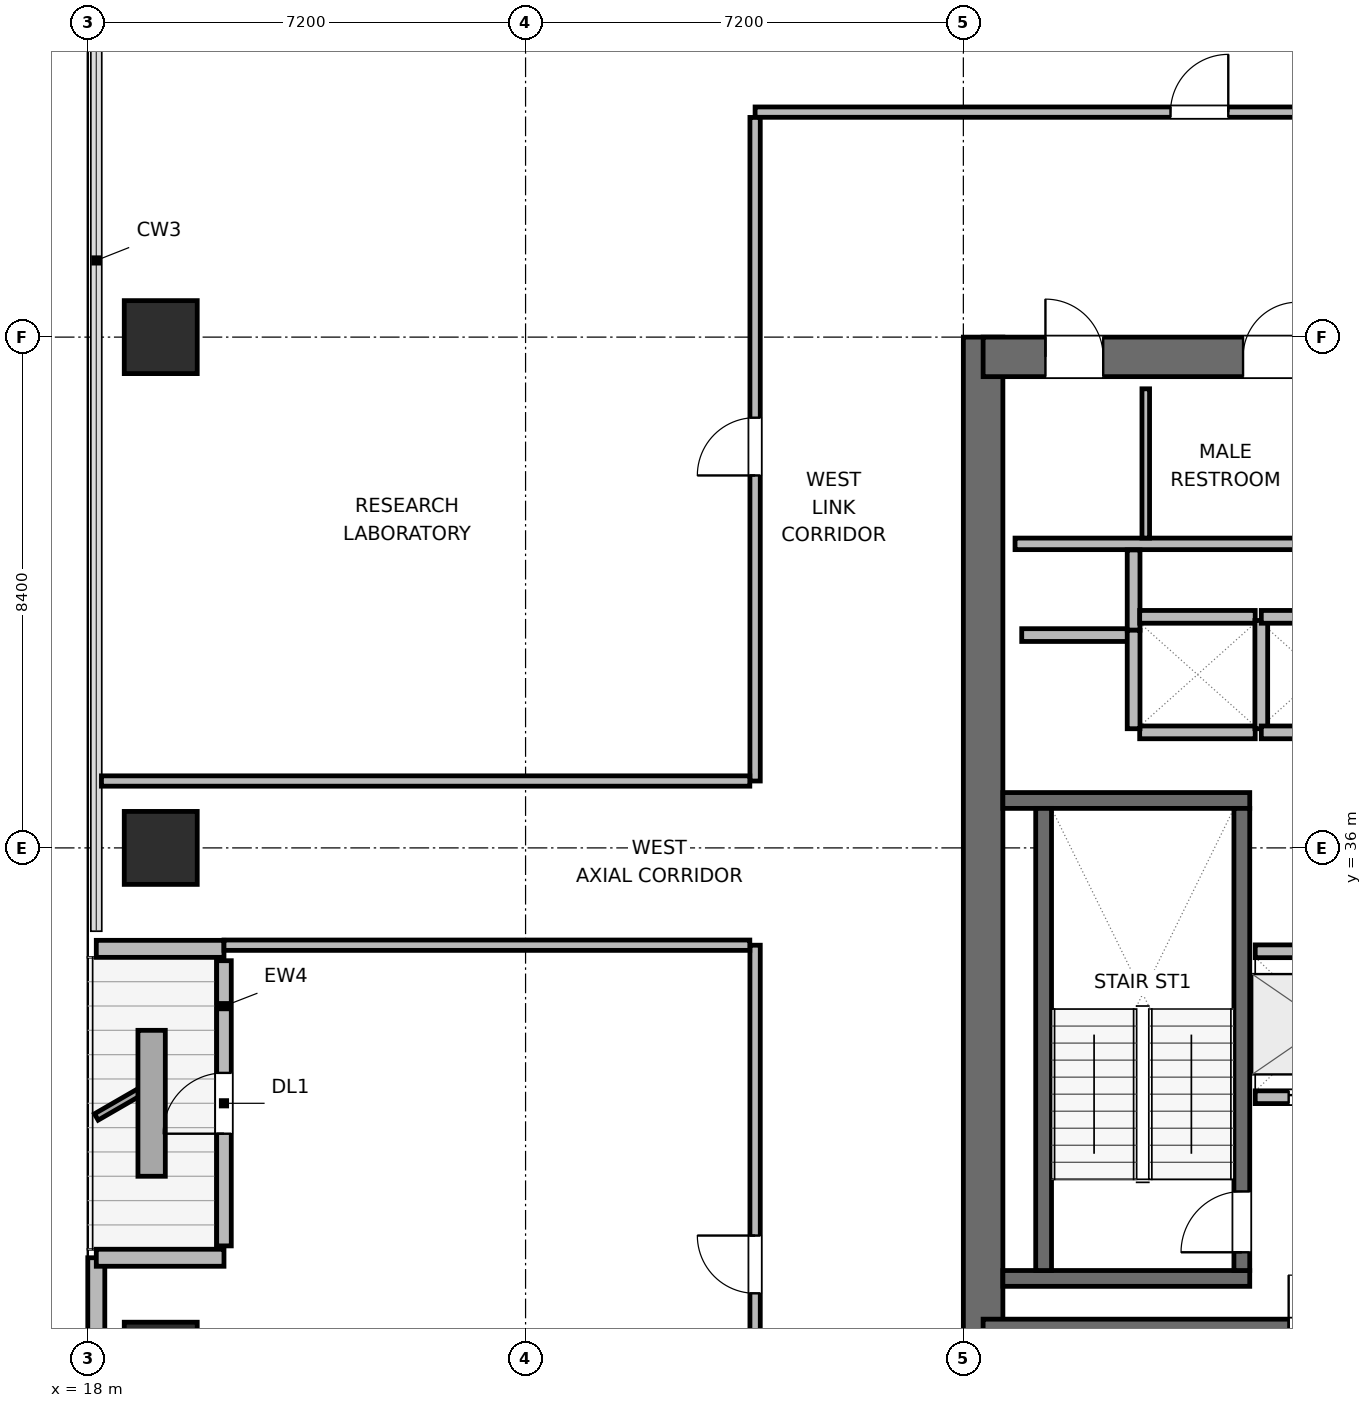
"""IFC4 building model, lengths in metres.
Left out: names, types, materials, properties, quantities, classifications, styles, units other than length and angle.
Written with IfcOpenShell. Run it as: python <this file> out.ifc"""

import sys

from ifc_helpers import new_model, si_unit, direction, frame, frame_2d, origin, origin_2d, place, context, subcontext, project, spatial, rectangle, extrude, element, fill, save


model = new_model("IFC4")
c1 = context("Model", 3, precision=1e-05, world=origin(), true_north=direction((0.0, 1.0)))
c2 = subcontext(c1, "Body", "Model", "MODEL_VIEW")
j1 = project(units=[si_unit("LENGTHUNIT", "METRE"), si_unit("PLANEANGLEUNIT", "RADIAN")], contexts=[c1])
p1 = place(None, origin())
s1 = spatial("IfcSite", under=j1, at=p1, CompositionType="ELEMENT")
p2 = place(p1, origin())
s2 = spatial("IfcBuilding", under=s1, at=p2, CompositionType="ELEMENT")
p3 = place(p2, frame((0.0, 0.0, 205.8)))
s3 = spatial("IfcBuildingStorey", under=s2, at=p3, CompositionType="ELEMENT", Elevation=205.8)
p4 = place(p3, frame((32.725, 27.6, 0.0), z_axis=(0.0, 0.0, 1.0), x_axis=(0.0, 1.0, 0.0)))
e1 = element("IfcWall", 1, at=p4, inside=s3, PredefinedType="SHEAR", context=c2, shape_type="SweptSolid", body=[
    extrude(rectangle(XDim=16.8, YDim=0.65, at=frame_2d((8.4, 0.0))), origin(), (0.0, 0.0, 1.0), 3.9),
])
p5 = place(p3, frame((32.725, 27.925, 0.0), z_axis=(0.0, 0.0, 1.0), x_axis=(1.0, 0.0, 0.0)))
e2 = element("IfcWall", 2, at=p5, inside=s3, PredefinedType="SHEAR", context=c2, shape_type="SweptSolid", body=[
    extrude(rectangle(XDim=9.35, YDim=0.65, at=frame_2d((4.675, 0.0))), origin(), (0.0, 0.0, 1.0), 3.9),
])
p6 = place(p5, frame((5.025, 0.0, 0.0)))
e3 = element("IfcOpeningElement", 3, at=p6, cuts=e2, PredefinedType="OPENING", context=c2, shape_type="SweptSolid", body=[
    extrude(rectangle(XDim=1.05, YDim=2.04, at=frame_2d((0.525, 1.02))), frame((0.0, 0.335, 0.0), z_axis=(0.0, -1.0, 0.0), x_axis=(1.0, 0.0, 0.0)), (0.0, 0.0, 1.0), 0.67),
])
p7 = place(p3, frame((32.725, 44.075, 0.0), z_axis=(0.0, 0.0, 1.0), x_axis=(1.0, 0.0, 0.0)))
e4 = element("IfcWall", 4, at=p7, inside=s3, PredefinedType="SHEAR", context=c2, shape_type="SweptSolid", body=[
    extrude(rectangle(XDim=9.35, YDim=0.65, at=frame_2d((4.675, 0.0))), origin(), (0.0, 0.0, 1.0), 3.9),
])
p8 = place(p7, frame((1.025, 0.0, 0.0)))
e5 = element("IfcOpeningElement", 5, at=p8, cuts=e4, PredefinedType="OPENING", context=c2, shape_type="SweptSolid", body=[
    extrude(rectangle(XDim=0.95, YDim=2.04, at=frame_2d((0.475, 1.02))), frame((0.0, 0.335, 0.0), z_axis=(0.0, -1.0, 0.0), x_axis=(1.0, 0.0, 0.0)), (0.0, 0.0, 1.0), 0.67),
])
p9 = place(p7, frame((4.275, 0.0, 0.0)))
e6 = element("IfcOpeningElement", 6, at=p9, cuts=e4, PredefinedType="OPENING", context=c2, shape_type="SweptSolid", body=[
    extrude(rectangle(XDim=0.9, YDim=2.02, at=frame_2d((0.45, 1.01))), frame((0.0, 0.335, 0.0), z_axis=(0.0, -1.0, 0.0), x_axis=(1.0, 0.0, 0.0)), (0.0, 0.0, 1.0), 0.67),
])
p10 = place(p7, frame((7.175, 0.0, 0.0)))
e7 = element("IfcOpeningElement", 7, at=p10, cuts=e4, PredefinedType="OPENING", context=c2, shape_type="SweptSolid", body=[
    extrude(rectangle(XDim=0.9, YDim=2.02, at=frame_2d((0.45, 1.01))), frame((0.0, 0.335, 0.0), z_axis=(0.0, -1.0, 0.0), x_axis=(1.0, 0.0, 0.0)), (0.0, 0.0, 1.0), 0.67),
])
for number, where, z_axis, x_axis in (
    (8, (33.05, 28.92, 0.0), (0.0, 0.0, 1.0), (1.0, 0.0, 0.0)),
    (9, (33.05, 36.78, 0.0), (0.0, 0.0, 1.0), (1.0, 0.0, 0.0)),
):
    element("IfcWall", number, at=place(p3, frame(where, z_axis=z_axis, x_axis=x_axis)), inside=s3, PredefinedType="SHEAR", context=c2, shape_type="SweptSolid", body=[
        extrude(rectangle(XDim=4.06, YDim=0.26, at=frame_2d((2.03, 0.0))), origin(), (0.0, 0.0, 1.0), 3.9),
    ])
p11 = place(p3, frame((33.72, 29.05, 0.0), z_axis=(0.0, 0.0, 1.0), x_axis=(0.0, 1.0, 0.0)))
e10 = element("IfcWall", 10, at=p11, inside=s3, PredefinedType="SHEAR", context=c2, shape_type="SweptSolid", body=[
    extrude(rectangle(XDim=7.6, YDim=0.26, at=frame_2d((3.8, 0.0))), origin(), (0.0, 0.0, 1.0), 3.9),
])
p12 = place(p3, frame((36.98, 29.05, 0.0), z_axis=(0.0, 0.0, 1.0), x_axis=(0.0, 1.0, 0.0)))
e11 = element("IfcWall", 11, at=p12, inside=s3, PredefinedType="SHEAR", context=c2, shape_type="SweptSolid", body=[
    extrude(rectangle(XDim=7.6, YDim=0.26, at=frame_2d((3.8, 0.0))), origin(), (0.0, 0.0, 1.0), 3.9),
])
p13 = place(p12, frame((0.3, 0.0, 0.0)))
e12 = element("IfcOpeningElement", 12, at=p13, cuts=e11, PredefinedType="OPENING", context=c2, shape_type="SweptSolid", body=[
    extrude(rectangle(XDim=1.0, YDim=2.04, at=frame_2d((0.5, 1.02))), frame((0.0, 0.14, 0.0), z_axis=(0.0, -1.0, 0.0), x_axis=(1.0, 0.0, 0.0)), (0.0, 0.0, 1.0), 0.28),
])
for number, where, z_axis, x_axis in (
    (13, (19.2, 27.6, 0.0), (0.0, 0.0, 1.0), (1.0, 0.0, 0.0)),
    (14, (19.2, 36.0, 0.0), (0.0, 0.0, 1.0), (1.0, 0.0, 0.0)),
    (15, (19.2, 44.4, 0.0), (0.0, 0.0, 1.0), (1.0, 0.0, 0.0)),
):
    element("IfcColumn", number, at=place(p3, frame(where, z_axis=z_axis, x_axis=x_axis)), inside=s3, PredefinedType="COLUMN", context=c2, shape_type="SweptSolid", body=[
        extrude(rectangle(XDim=1.2, YDim=1.2, at=origin_2d()), origin(), (0.0, 0.0, 1.0), 3.9),
    ])
p14 = place(p3, frame((18.14, 24.018, 0.0), z_axis=(0.0, 0.0, 1.0), x_axis=(0.0, 1.0, 0.0)))
e16 = element("IfcWall", 16, at=p14, inside=s3, PredefinedType="SOLIDWALL", context=c2, shape_type="SweptSolid", body=[
    extrude(rectangle(XDim=5.242, YDim=0.28, at=frame_2d((2.621, 0.0))), origin(), (0.0, 0.0, 1.0), 3.6),
])
p15 = place(p3, frame((18.14, 29.26, 0.0), z_axis=(0.0, 0.0, 1.0), x_axis=(1.0, 0.0, 0.0)))
e17 = element("IfcWall", 17, at=p15, inside=s3, PredefinedType="SOLIDWALL", context=c2, shape_type="SweptSolid", body=[
    extrude(rectangle(XDim=2.1, YDim=0.28, at=frame_2d((1.05, 0.0))), origin(), (0.0, 0.0, 1.0), 2.195),
])
p16 = place(p3, frame((20.24, 29.455, 0.0), z_axis=(0.0, 0.0, 1.0), x_axis=(0.0, 1.0, 0.0)))
e18 = element("IfcWall", 18, at=p16, inside=s3, PredefinedType="SOLIDWALL", context=c2, shape_type="SweptSolid", body=[
    extrude(rectangle(XDim=4.69, YDim=0.24, at=frame_2d((2.345, 0.0))), origin(), (0.0, 0.0, 1.0), 3.168),
])
p17 = place(p16, frame((1.845, 0.0, 0.0)))
e19 = element("IfcOpeningElement", 19, at=p17, cuts=e18, PredefinedType="OPENING", context=c2, shape_type="SweptSolid", body=[
    extrude(rectangle(XDim=1.0, YDim=2.02, at=frame_2d((0.5, 1.01))), frame((0.0, 0.13, 0.0), z_axis=(0.0, -1.0, 0.0), x_axis=(1.0, 0.0, 0.0)), (0.0, 0.0, 1.0), 0.26),
])
p18 = place(p3, frame((20.24, 34.34, 0.0), z_axis=(0.0, 0.0, 1.0), x_axis=(-1.0, 0.0, 0.0)))
e20 = element("IfcWall", 20, at=p18, inside=s3, PredefinedType="SOLIDWALL", context=c2, shape_type="SweptSolid", body=[
    extrude(rectangle(XDim=2.1, YDim=0.28, at=frame_2d((1.05, 0.0))), origin(), (0.0, 0.0, 1.0), 2.195),
])
p19 = place(p3, frame((33.25, 41.0, 0.0), z_axis=(0.0, 0.0, 1.0), x_axis=(1.0, 0.0, 0.0)))
e21 = element("IfcWall", 21, at=p19, inside=s3, PredefinedType="PLUMBINGWALL", context=c2, shape_type="SweptSolid", body=[
    extrude(rectangle(XDim=8.3, YDim=0.19, at=frame_2d((4.15, 0.0))), origin(), (0.0, 0.0, 1.0), 3.6),
])
p20 = place(p3, frame((35.4, 41.095, 0.0), z_axis=(0.0, 0.0, 1.0), x_axis=(0.0, 1.0, 0.0)))
e22 = element("IfcWall", 22, at=p20, inside=s3, PredefinedType="PARTITIONING", context=c2, shape_type="SweptSolid", body=[
    extrude(rectangle(XDim=2.455, YDim=0.125, at=frame_2d((1.228, 0.0))), origin(), (0.0, 0.0, 1.0), 3.6),
])
p21 = place(p3, frame((33.36, 39.5, 0.0), z_axis=(0.0, 0.0, 1.0), x_axis=(1.0, 0.0, 0.0)))
e23 = element("IfcWall", 23, at=p21, inside=s3, PredefinedType="PARTITIONING", context=c2, shape_type="SweptSolid", body=[
    extrude(rectangle(XDim=1.86, YDim=0.21, at=frame_2d((0.93, 0.0))), origin(), (0.0, 0.0, 1.0), 3.6),
])
p22 = place(p3, frame((35.2, 39.58, 0.0), z_axis=(0.0, 0.0, 1.0), x_axis=(0.0, 1.0, 0.0)))
e24 = element("IfcWall", 24, at=p22, inside=s3, PredefinedType="PARTITIONING", context=c2, shape_type="SweptSolid", body=[
    extrude(rectangle(XDim=1.32, YDim=0.21, at=frame_2d((0.66, 0.0))), origin(), (0.0, 0.0, 1.0), 3.6),
])
p23 = place(p3, frame((37.2, 31.9, 0.0), z_axis=(0.0, 0.0, 1.0), x_axis=(1.0, 0.0, 0.0)))
e25 = element("IfcWall", 25, at=p23, inside=s3, PredefinedType="PARTITIONING", context=c2, shape_type="SweptSolid", body=[
    extrude(rectangle(XDim=2.3, YDim=0.21, at=frame_2d((1.15, 0.0))), origin(), (0.0, 0.0, 1.0), 3.6),
])
p24 = place(p23, frame((0.55, 0.0, 0.0)))
e26 = element("IfcOpeningElement", 26, at=p24, cuts=e25, PredefinedType="OPENING", context=c2, shape_type="SweptSolid", body=[
    extrude(rectangle(XDim=1.2, YDim=2.04, at=frame_2d((0.6, 1.02))), frame((0.0, 0.115, 0.0), z_axis=(0.0, -1.0, 0.0), x_axis=(1.0, 0.0, 0.0)), (0.0, 0.0, 1.0), 0.23),
])
p25 = place(p3, frame((37.2, 34.3, 0.0), z_axis=(0.0, 0.0, 1.0), x_axis=(1.0, 0.0, 0.0)))
e27 = element("IfcWall", 27, at=p25, inside=s3, PredefinedType="PARTITIONING", context=c2, shape_type="SweptSolid", body=[
    extrude(rectangle(XDim=2.3, YDim=0.21, at=frame_2d((1.15, 0.0))), origin(), (0.0, 0.0, 1.0), 3.6),
])
for number, where, z_axis, x_axis in (
    (28, (35.3, 37.9, 0.0), (0.0, 0.0, 1.0), (1.0, 0.0, 0.0)),
    (29, (35.3, 39.8, 0.0), (0.0, 0.0, 1.0), (1.0, 0.0, 0.0)),
):
    element("IfcWall", number, at=place(p3, frame(where, z_axis=z_axis, x_axis=x_axis)), inside=s3, PredefinedType="PARTITIONING", context=c2, shape_type="SweptSolid", body=[
        extrude(rectangle(XDim=1.9, YDim=0.21, at=frame_2d((0.95, 0.0))), origin(), (0.0, 0.0, 1.0), 3.6),
    ])
p26 = place(p3, frame((35.2, 37.96, 0.0), z_axis=(0.0, 0.0, 1.0), x_axis=(0.0, 1.0, 0.0)))
e30 = element("IfcWall", 30, at=p26, inside=s3, PredefinedType="PARTITIONING", context=c2, shape_type="SweptSolid", body=[
    extrude(rectangle(XDim=1.62, YDim=0.21, at=frame_2d((0.81, 0.0))), origin(), (0.0, 0.0, 1.0), 3.6),
])
p27 = place(p3, frame((37.3, 37.96, 0.0), z_axis=(0.0, 0.0, 1.0), x_axis=(0.0, 1.0, 0.0)))
e31 = element("IfcWall", 31, at=p27, inside=s3, PredefinedType="PARTITIONING", context=c2, shape_type="SweptSolid", body=[
    extrude(rectangle(XDim=1.78, YDim=0.21, at=frame_2d((0.89, 0.0))), origin(), (0.0, 0.0, 1.0), 3.6),
])
for number, where, z_axis, x_axis in (
    (32, (37.3, 37.9, 0.0), (0.0, 0.0, 1.0), (1.0, 0.0, 0.0)),
    (33, (37.3, 39.8, 0.0), (0.0, 0.0, 1.0), (1.0, 0.0, 0.0)),
):
    element("IfcWall", number, at=place(p3, frame(where, z_axis=z_axis, x_axis=x_axis)), inside=s3, PredefinedType="PARTITIONING", context=c2, shape_type="SweptSolid", body=[
        extrude(rectangle(XDim=1.9, YDim=0.21, at=frame_2d((0.95, 0.0))), origin(), (0.0, 0.0, 1.0), 3.6),
    ])
p28 = place(p3, frame((28.975, 48.1, 0.0), z_axis=(0.0, 0.0, 1.0), x_axis=(1.0, 0.0, 0.0)))
e34 = element("IfcWall", 34, at=p28, inside=s3, PredefinedType="PARTITIONING", context=c2, shape_type="SweptSolid", body=[
    extrude(rectangle(XDim=34.625, YDim=0.17, at=frame_2d((17.312, 0.0))), origin(), (0.0, 0.0, 1.0), 3.6),
])
p29 = place(p28, frame((6.832, 0.0, 0.0)))
e35 = element("IfcOpeningElement", 35, at=p29, cuts=e34, PredefinedType="OPENING", context=c2, shape_type="SweptSolid", body=[
    extrude(rectangle(XDim=0.95, YDim=2.04, at=frame_2d((0.475, 1.02))), frame((0.0, 0.095, 0.0), z_axis=(0.0, -1.0, 0.0), x_axis=(1.0, 0.0, 0.0)), (0.0, 0.0, 1.0), 0.19),
])
p30 = place(p28, frame((17.245, 0.0, 0.0)))
e36 = element("IfcOpeningElement", 36, at=p30, cuts=e34, PredefinedType="OPENING", context=c2, shape_type="SweptSolid", body=[
    extrude(rectangle(XDim=0.95, YDim=2.04, at=frame_2d((0.475, 1.02))), frame((0.0, 0.095, 0.0), z_axis=(0.0, -1.0, 0.0), x_axis=(1.0, 0.0, 0.0)), (0.0, 0.0, 1.0), 0.19),
])
p31 = place(p28, frame((21.475, 0.0, 0.0)))
e37 = element("IfcOpeningElement", 37, at=p31, cuts=e34, PredefinedType="OPENING", context=c2, shape_type="SweptSolid", body=[
    extrude(rectangle(XDim=0.95, YDim=2.04, at=frame_2d((0.475, 1.02))), frame((0.0, 0.095, 0.0), z_axis=(0.0, -1.0, 0.0), x_axis=(1.0, 0.0, 0.0)), (0.0, 0.0, 1.0), 0.19),
])
p32 = place(p28, frame((28.375, 0.0, 0.0)))
e38 = element("IfcOpeningElement", 38, at=p32, cuts=e34, PredefinedType="OPENING", context=c2, shape_type="SweptSolid", body=[
    extrude(rectangle(XDim=0.95, YDim=2.04, at=frame_2d((0.475, 1.02))), frame((0.0, 0.095, 0.0), z_axis=(0.0, -1.0, 0.0), x_axis=(1.0, 0.0, 0.0)), (0.0, 0.0, 1.0), 0.19),
])
p33 = place(p3, frame((28.975, 23.987, 0.0), z_axis=(0.0, 0.0, 1.0), x_axis=(0.0, 1.0, 0.0)))
e39 = element("IfcWall", 39, at=p33, inside=s3, PredefinedType="PARTITIONING", context=c2, shape_type="SweptSolid", body=[
    extrude(rectangle(XDim=10.413, YDim=0.17, at=frame_2d((5.207, 0.0))), origin(), (0.0, 0.0, 1.0), 3.6),
])
p34 = place(p33, frame((4.688, 0.0, 0.0)))
e40 = element("IfcOpeningElement", 40, at=p34, cuts=e39, PredefinedType="OPENING", context=c2, shape_type="SweptSolid", body=[
    extrude(rectangle(XDim=0.95, YDim=2.04, at=frame_2d((0.475, 1.02))), frame((0.0, 0.095, 0.0), z_axis=(0.0, -1.0, 0.0), x_axis=(1.0, 0.0, 0.0)), (0.0, 0.0, 1.0), 0.19),
])
p35 = place(p3, frame((28.975, 37.1, 0.0), z_axis=(0.0, 0.0, 1.0), x_axis=(0.0, 1.0, 0.0)))
e41 = element("IfcWall", 41, at=p35, inside=s3, PredefinedType="PARTITIONING", context=c2, shape_type="SweptSolid", body=[
    extrude(rectangle(XDim=10.913, YDim=0.17, at=frame_2d((5.457, 0.0))), origin(), (0.0, 0.0, 1.0), 3.6),
])
p36 = place(p35, frame((5.025, 0.0, 0.0)))
e42 = element("IfcOpeningElement", 42, at=p36, cuts=e41, PredefinedType="OPENING", context=c2, shape_type="SweptSolid", body=[
    extrude(rectangle(XDim=0.95, YDim=2.04, at=frame_2d((0.475, 1.02))), frame((0.0, 0.095, 0.0), z_axis=(0.0, -1.0, 0.0), x_axis=(1.0, 0.0, 0.0)), (0.0, 0.0, 1.0), 0.19),
])
p37 = place(p3, frame((20.24, 34.4, 0.0), z_axis=(0.0, 0.0, 1.0), x_axis=(1.0, 0.0, 0.0)))
e43 = element("IfcWall", 43, at=p37, inside=s3, PredefinedType="PARTITIONING", context=c2, shape_type="SweptSolid", body=[
    extrude(rectangle(XDim=8.648, YDim=0.17, at=frame_2d((4.324, 0.0))), origin(), (0.0, 0.0, 1.0), 3.6),
])
p38 = place(p3, frame((18.225, 37.1, 0.0), z_axis=(0.0, 0.0, 1.0), x_axis=(1.0, 0.0, 0.0)))
e44 = element("IfcWall", 44, at=p38, inside=s3, PredefinedType="PARTITIONING", context=c2, shape_type="SweptSolid", body=[
    extrude(rectangle(XDim=10.663, YDim=0.17, at=frame_2d((5.332, 0.0))), origin(), (0.0, 0.0, 1.0), 3.6),
])
p39 = place(p17, origin())
e45 = element("IfcDoor", 45, at=p39, inside=s3, OperationType="SINGLE_SWING_LEFT", PredefinedType="DOOR", context=c2, shape_type="SweptSolid", body=[
    extrude(rectangle(XDim=1.0, YDim=2.02, at=frame_2d((0.5, 1.01))), frame((0.0, 0.025, 0.0), z_axis=(0.0, -1.0, 0.0), x_axis=(1.0, 0.0, 0.0)), (0.0, 0.0, 1.0), 0.05),
])
fill(e19, e45)
p40 = place(p13, origin())
e46 = element("IfcDoor", 46, at=p40, inside=s3, OperationType="SINGLE_SWING_LEFT", PredefinedType="DOOR", context=c2, shape_type="SweptSolid", body=[
    extrude(rectangle(XDim=1.0, YDim=2.04, at=frame_2d((0.5, 1.02))), frame((0.0, 0.025, 0.0), z_axis=(0.0, -1.0, 0.0), x_axis=(1.0, 0.0, 0.0)), (0.0, 0.0, 1.0), 0.05),
])
fill(e12, e46)
p41 = place(p24, origin())
e47 = element("IfcDoor", 47, at=p41, inside=s3, OperationType="DOUBLE_DOOR_SLIDING", PredefinedType="DOOR", context=c2, shape_type="SweptSolid", body=[
    extrude(rectangle(XDim=1.2, YDim=2.04, at=frame_2d((0.6, 1.02))), frame((0.0, 0.025, 0.0), z_axis=(0.0, -1.0, 0.0), x_axis=(1.0, 0.0, 0.0)), (0.0, 0.0, 1.0), 0.05),
])
fill(e26, e47)
p42 = place(p8, origin())
e48 = element("IfcDoor", 48, at=p42, inside=s3, OperationType="SINGLE_SWING_LEFT", PredefinedType="DOOR", context=c2, shape_type="SweptSolid", body=[
    extrude(rectangle(XDim=0.95, YDim=2.04, at=frame_2d((0.475, 1.02))), frame((0.0, 0.025, 0.0), z_axis=(0.0, -1.0, 0.0), x_axis=(1.0, 0.0, 0.0)), (0.0, 0.0, 1.0), 0.05),
])
fill(e5, e48)
p43 = place(p9, origin())
e49 = element("IfcDoor", 49, at=p43, inside=s3, OperationType="SINGLE_SWING_RIGHT", PredefinedType="DOOR", context=c2, shape_type="SweptSolid", body=[
    extrude(rectangle(XDim=0.9, YDim=2.02, at=frame_2d((0.45, 1.01))), frame((0.0, 0.025, 0.0), z_axis=(0.0, -1.0, 0.0), x_axis=(1.0, 0.0, 0.0)), (0.0, 0.0, 1.0), 0.05),
])
fill(e6, e49)
p44 = place(p29, origin())
e50 = element("IfcDoor", 50, at=p44, inside=s3, OperationType="SINGLE_SWING_RIGHT", PredefinedType="DOOR", context=c2, shape_type="SweptSolid", body=[
    extrude(rectangle(XDim=0.95, YDim=2.04, at=frame_2d((0.475, 1.02))), frame((0.0, 0.025, 0.0), z_axis=(0.0, -1.0, 0.0), x_axis=(1.0, 0.0, 0.0)), (0.0, 0.0, 1.0), 0.05),
])
fill(e35, e50)
p45 = place(p34, origin())
e51 = element("IfcDoor", 51, at=p45, inside=s3, OperationType="SINGLE_SWING_RIGHT", PredefinedType="DOOR", context=c2, shape_type="SweptSolid", body=[
    extrude(rectangle(XDim=0.95, YDim=2.04, at=frame_2d((0.475, 1.02))), frame((0.0, 0.025, 0.0), z_axis=(0.0, -1.0, 0.0), x_axis=(1.0, 0.0, 0.0)), (0.0, 0.0, 1.0), 0.05),
])
fill(e40, e51)
p46 = place(p36, origin())
e52 = element("IfcDoor", 52, at=p46, inside=s3, OperationType="SINGLE_SWING_LEFT", PredefinedType="DOOR", context=c2, shape_type="SweptSolid", body=[
    extrude(rectangle(XDim=0.95, YDim=2.04, at=frame_2d((0.475, 1.02))), frame((0.0, 0.025, 0.0), z_axis=(0.0, -1.0, 0.0), x_axis=(1.0, 0.0, 0.0)), (0.0, 0.0, 1.0), 0.05),
])
fill(e42, e52)
save(model, sys.argv[1])
